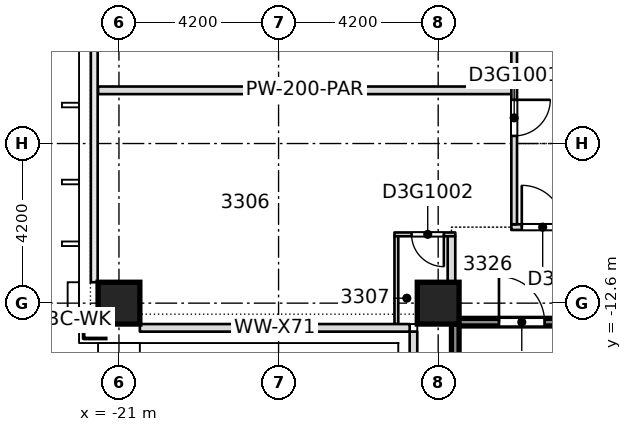
"""IFC4 building model, lengths in metres.
Left out: names, types, materials, properties, quantities, classifications, styles, units other than length and angle.
Written with IfcOpenShell. Run it as: python <this file> out.ifc"""

import sys

from ifc_helpers import new_model, si_unit, direction, frame, frame_2d, origin, origin_2d, place, context, subcontext, project, spatial, rectangle, extrude, element, fill, save


model = new_model("IFC4")
c1 = context("Model", 3, precision=1e-05, world=origin(), true_north=direction((0.0, 1.0)))
c2 = subcontext(c1, "Body", "Model", "MODEL_VIEW")
j1 = project(units=[si_unit("LENGTHUNIT", "METRE"), si_unit("PLANEANGLEUNIT", "RADIAN")], contexts=[c1])
p1 = place(None, origin())
s1 = spatial("IfcSite", under=j1, at=p1, CompositionType="ELEMENT")
p2 = place(p1, origin())
s2 = spatial("IfcBuilding", under=s1, at=p2, CompositionType="ELEMENT")
p3 = place(p2, frame((0.0, 0.0, 133.1)))
s3 = spatial("IfcBuildingStorey", under=s2, at=p3, CompositionType="ELEMENT", Elevation=133.1)
for number, where, z_axis, x_axis in (
    (1, (-21.0, -12.6, -0.4), (0.0, 0.0, 1.0), (1.0, 0.0, 0.0)),
    (2, (-12.6, -12.6, -0.4), (0.0, 0.0, 1.0), (1.0, 0.0, 0.0)),
):
    element("IfcColumn", number, at=place(p3, frame(where, z_axis=z_axis, x_axis=x_axis)), inside=s3, PredefinedType="COLUMN", context=c2, shape_type="SweptSolid", body=[
        extrude(rectangle(XDim=1.1, YDim=1.1, at=origin_2d()), origin(), (0.0, 0.0, 1.0), 3.45),
    ])
p4 = place(p3, frame((-12.15, -13.1, 0.0), z_axis=(0.0, 0.0, 1.0), x_axis=(1.0, 0.0, 0.0)))
e3 = element("IfcWall", 3, at=p4, inside=s3, PredefinedType="SOLIDWALL", context=c2, shape_type="SweptSolid", body=[
    extrude(rectangle(XDim=3.5, YDim=0.2, at=frame_2d((1.75, 0.0))), origin(), (0.0, 0.0, 1.0), 3.05),
])
p5 = place(p4, frame((1.15, 0.0, 0.0)))
e4 = element("IfcOpeningElement", 4, at=p5, cuts=e3, PredefinedType="OPENING", context=c2, shape_type="SweptSolid", body=[
    extrude(rectangle(XDim=1.2, YDim=2.1, at=frame_2d((0.6, 1.05))), frame((0.0, 0.11, 0.0), z_axis=(0.0, -1.0, 0.0), x_axis=(1.0, 0.0, 0.0)), (0.0, 0.0, 1.0), 0.22),
])
p6 = place(p3, frame((-13.75, -10.79, 0.0), z_axis=(0.0, 0.0, 1.0), x_axis=(1.0, 0.0, 0.0)))
e5 = element("IfcWall", 5, at=p6, inside=s3, PredefinedType="PARTITIONING", context=c2, shape_type="SweptSolid", body=[
    extrude(rectangle(XDim=1.6, YDim=0.1, at=frame_2d((0.8, 0.0))), origin(), (0.0, 0.0, 1.0), 3.05),
])
p7 = place(p6, frame((0.45, 0.0, 0.0)))
e6 = element("IfcOpeningElement", 6, at=p7, cuts=e5, PredefinedType="OPENING", context=c2, shape_type="SweptSolid", body=[
    extrude(rectangle(XDim=0.85, YDim=2.1, at=frame_2d((0.425, 1.05))), frame((0.0, 0.06, 0.0), z_axis=(0.0, -1.0, 0.0), x_axis=(1.0, 0.0, 0.0)), (0.0, 0.0, 1.0), 0.12),
])
p8 = place(p3, frame((-10.675, -10.6, 0.0), z_axis=(0.0, 0.0, 1.0), x_axis=(1.0, 0.0, 0.0)))
e7 = element("IfcWall", 7, at=p8, inside=s3, PredefinedType="PARTITIONING", context=c2, shape_type="SweptSolid", body=[
    extrude(rectangle(XDim=6.775, YDim=0.15, at=frame_2d((3.388, 0.0))), origin(), (0.0, 0.0, 1.0), 3.05),
])
p9 = place(p8, frame((3.95, 0.0, 0.0)))
e8 = element("IfcOpeningElement", 8, at=p9, cuts=e7, PredefinedType="OPENING", context=c2, shape_type="SweptSolid", body=[
    extrude(rectangle(XDim=0.95, YDim=2.1, at=frame_2d((0.475, 1.05))), frame((0.0, 0.085, 0.0), z_axis=(0.0, -1.0, 0.0), x_axis=(1.0, 0.0, 0.0)), (0.0, 0.0, 1.0), 0.17),
])
p10 = place(p8, frame((0.275, 0.0, 0.0)))
e9 = element("IfcOpeningElement", 9, at=p10, cuts=e7, PredefinedType="OPENING", context=c2, shape_type="SweptSolid", body=[
    extrude(rectangle(XDim=1.1, YDim=2.1, at=frame_2d((0.55, 1.05))), frame((0.0, 0.085, 0.0), z_axis=(0.0, -1.0, 0.0), x_axis=(1.0, 0.0, 0.0)), (0.0, 0.0, 1.0), 0.17),
])
p11 = place(p3, frame((-21.55, -7.0, 0.0), z_axis=(0.0, 0.0, 1.0), x_axis=(1.0, 0.0, 0.0)))
e10 = element("IfcWall", 10, at=p11, inside=s3, PredefinedType="PARTITIONING", context=c2, shape_type="SweptSolid", body=[
    extrude(rectangle(XDim=10.875, YDim=0.2, at=frame_2d((5.438, 0.0))), origin(), (0.0, 0.0, 1.0), 3.05),
])
p12 = place(p3, frame((-13.7, -13.15, 0.0), z_axis=(0.0, 0.0, 1.0), x_axis=(0.0, 1.0, 0.0)))
e11 = element("IfcWall", 11, at=p12, inside=s3, PredefinedType="PARTITIONING", context=c2, shape_type="SweptSolid", body=[
    extrude(rectangle(XDim=2.31, YDim=0.1, at=frame_2d((1.155, 0.0))), origin(), (0.0, 0.0, 1.0), 3.05),
])
p13 = place(p3, frame((-12.25, -12.89, 0.0), z_axis=(0.0, 0.0, 1.0), x_axis=(0.0, 1.0, 0.0)))
e12 = element("IfcWall", 12, at=p13, inside=s3, PredefinedType="PARTITIONING", context=c2, shape_type="SweptSolid", body=[
    extrude(rectangle(XDim=2.05, YDim=0.2, at=frame_2d((1.025, 0.0))), origin(), (0.0, 0.0, 1.0), 3.05),
])
p14 = place(p3, frame((-10.6, -10.525, 0.0), z_axis=(0.0, 0.0, 1.0), x_axis=(0.0, 1.0, 0.0)))
e13 = element("IfcWall", 13, at=p14, inside=s3, PredefinedType="PARTITIONING", context=c2, shape_type="SweptSolid", body=[
    extrude(rectangle(XDim=13.875, YDim=0.15, at=frame_2d((6.938, 0.0))), origin(), (0.0, 0.0, 1.0), 3.05),
])
p15 = place(p14, frame((2.325, 0.0, 0.0)))
e14 = element("IfcOpeningElement", 14, at=p15, cuts=e13, PredefinedType="OPENING", context=c2, shape_type="SweptSolid", body=[
    extrude(rectangle(XDim=0.95, YDim=2.1, at=frame_2d((0.475, 1.05))), frame((0.0, 0.085, 0.0), z_axis=(0.0, -1.0, 0.0), x_axis=(1.0, 0.0, 0.0)), (0.0, 0.0, 1.0), 0.17),
])
p16 = place(p14, frame((9.975, 0.0, 0.0)))
e15 = element("IfcOpeningElement", 15, at=p16, cuts=e13, PredefinedType="OPENING", context=c2, shape_type="SweptSolid", body=[
    extrude(rectangle(XDim=1.1, YDim=2.1, at=frame_2d((0.55, 1.05))), frame((0.0, 0.085, 0.0), z_axis=(0.0, -1.0, 0.0), x_axis=(1.0, 0.0, 0.0)), (0.0, 0.0, 1.0), 0.17),
])
p17 = place(p14, frame((4.825, 0.0, 0.0)))
e16 = element("IfcOpeningElement", 16, at=p17, cuts=e13, PredefinedType="OPENING", context=c2, shape_type="SweptSolid", body=[
    extrude(rectangle(XDim=1.0, YDim=2.1, at=frame_2d((0.5, 1.05))), frame((0.0, 0.085, 0.0), z_axis=(0.0, -1.0, 0.0), x_axis=(1.0, 0.0, 0.0)), (0.0, 0.0, 1.0), 0.17),
])
p18 = place(p14, frame((12.225, 0.0, 0.0)))
e17 = element("IfcOpeningElement", 17, at=p18, cuts=e13, PredefinedType="OPENING", context=c2, shape_type="SweptSolid", body=[
    extrude(rectangle(XDim=1.0, YDim=2.1, at=frame_2d((0.5, 1.05))), frame((0.0, 0.085, 0.0), z_axis=(0.0, -1.0, 0.0), x_axis=(1.0, 0.0, 0.0)), (0.0, 0.0, 1.0), 0.17),
])
p19 = place(p3, frame((-20.45, -13.25, 0.0), z_axis=(0.0, 0.0, 1.0), x_axis=(1.0, 0.0, 0.0)))
e18 = element("IfcWall", 18, at=p19, inside=s3, PredefinedType="STANDARD", context=c2, shape_type="SweptSolid", body=[
    extrude(rectangle(XDim=7.1, YDim=0.2, at=frame_2d((3.55, 0.0))), origin(), (0.0, 0.0, 1.0), 3.05),
])
p20 = place(p3, frame((-13.25, -13.35, 0.0), z_axis=(0.0, 0.0, 1.0), x_axis=(0.0, -1.0, 0.0)))
e19 = element("IfcWall", 19, at=p20, inside=s3, PredefinedType="STANDARD", context=c2, shape_type="SweptSolid", body=[
    extrude(rectangle(XDim=7.1, YDim=0.2, at=frame_2d((3.55, 0.0))), origin(), (0.0, 0.0, 1.0), 3.05),
])
p21 = place(p20, frame((4.375, 0.0, 0.2)))
e20 = element("IfcOpeningElement", 20, at=p21, cuts=e19, PredefinedType="OPENING", context=c2, shape_type="SweptSolid", body=[
    extrude(rectangle(XDim=1.8, YDim=2.65, at=frame_2d((0.9, 1.325))), frame((0.0, 0.11, 0.0), z_axis=(0.0, -1.0, 0.0), x_axis=(1.0, 0.0, 0.0)), (0.0, 0.0, 1.0), 0.22),
])
p22 = place(p20, frame((0.825, 0.0, 0.2)))
e21 = element("IfcOpeningElement", 21, at=p22, cuts=e19, PredefinedType="OPENING", context=c2, shape_type="SweptSolid", body=[
    extrude(rectangle(XDim=1.8, YDim=2.65, at=frame_2d((0.9, 1.325))), frame((0.0, 0.11, 0.0), z_axis=(0.0, -1.0, 0.0), x_axis=(1.0, 0.0, 0.0)), (0.0, 0.0, 1.0), 0.22),
])
p23 = place(p3, frame((-12.15, -20.45, 0.0), z_axis=(0.0, 0.0, 1.0), x_axis=(0.0, 1.0, 0.0)))
e22 = element("IfcWall", 22, at=p23, inside=s3, PredefinedType="SOLIDWALL", context=c2, shape_type="SweptSolid", body=[
    extrude(rectangle(XDim=7.3, YDim=0.2, at=frame_2d((3.65, 0.0))), origin(), (0.0, 0.0, 1.0), 3.05),
])
p24 = place(p15, origin())
e23 = element("IfcDoor", 23, at=p24, inside=s3, OperationType="SINGLE_SWING_RIGHT", PredefinedType="DOOR", context=c2, shape_type="SweptSolid", body=[
    extrude(rectangle(XDim=0.95, YDim=2.1, at=frame_2d((0.475, 1.05))), frame((0.0, 0.025, 0.0), z_axis=(0.0, -1.0, 0.0), x_axis=(1.0, 0.0, 0.0)), (0.0, 0.0, 1.0), 0.05),
])
fill(e14, e23)
p25 = place(p7, origin())
e24 = element("IfcDoor", 24, at=p25, inside=s3, OperationType="SINGLE_SWING_RIGHT", PredefinedType="DOOR", context=c2, shape_type="SweptSolid", body=[
    extrude(rectangle(XDim=0.85, YDim=2.1, at=frame_2d((0.425, 1.05))), frame((0.0, 0.025, 0.0), z_axis=(0.0, -1.0, 0.0), x_axis=(1.0, 0.0, 0.0)), (0.0, 0.0, 1.0), 0.05),
])
fill(e6, e24)
p26 = place(p10, origin())
e25 = element("IfcDoor", 25, at=p26, inside=s3, OperationType="SINGLE_SWING_RIGHT", PredefinedType="DOOR", context=c2, shape_type="SweptSolid", body=[
    extrude(rectangle(XDim=1.1, YDim=2.1, at=frame_2d((0.55, 1.05))), frame((0.0, 0.025, 0.0), z_axis=(0.0, -1.0, 0.0), x_axis=(1.0, 0.0, 0.0)), (0.0, 0.0, 1.0), 0.05),
])
fill(e9, e25)
p27 = place(p5, origin())
e26 = element("IfcDoor", 26, at=p27, inside=s3, OperationType="SINGLE_SWING_RIGHT", PredefinedType="DOOR", context=c2, shape_type="SweptSolid", body=[
    extrude(rectangle(XDim=1.2, YDim=2.1, at=frame_2d((0.6, 1.05))), frame((0.0, 0.025, 0.0), z_axis=(0.0, -1.0, 0.0), x_axis=(1.0, 0.0, 0.0)), (0.0, 0.0, 1.0), 0.05),
])
fill(e4, e26)
save(model, sys.argv[1])
